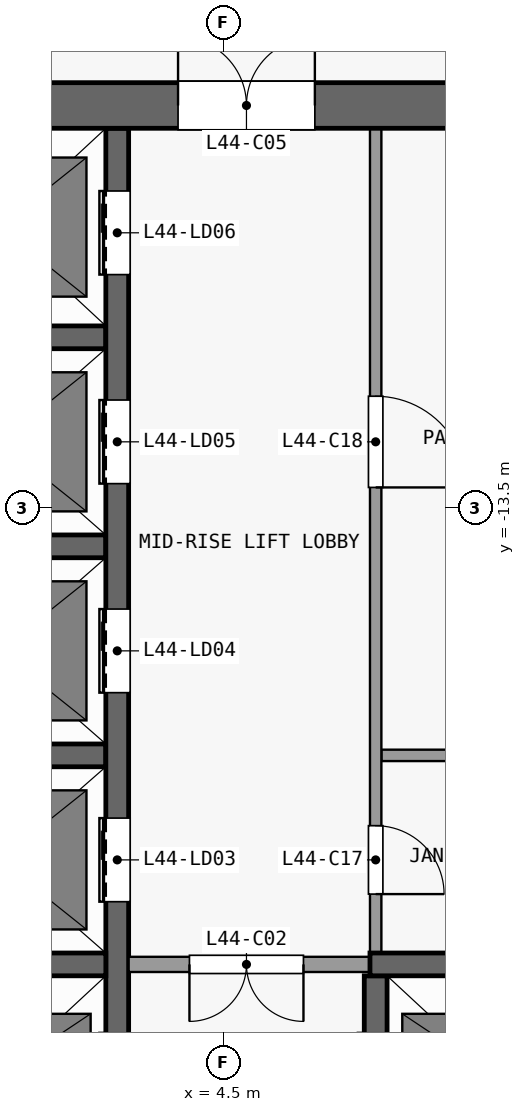
"""IFC4 building model, lengths in metres.
Left out: names, types, materials, properties, quantities, classifications, styles, units other than length and angle.
Written with IfcOpenShell. Run it as: python <this file> out.ifc"""

import sys

from ifc_helpers import new_model, si_unit, direction, frame, frame_2d, origin, place, context, subcontext, project, spatial, rectangle, extrude, element, fill, save


model = new_model("IFC4")
c1 = context("Model", 3, precision=1e-05, world=origin(), true_north=direction((0.0, 1.0)))
c2 = subcontext(c1, "Body", "Model", "MODEL_VIEW")
j1 = project(units=[si_unit("LENGTHUNIT", "METRE"), si_unit("PLANEANGLEUNIT", "RADIAN")], contexts=[c1])
p1 = place(None, origin())
s1 = spatial("IfcSite", under=j1, at=p1, CompositionType="ELEMENT")
p2 = place(p1, origin())
s2 = spatial("IfcBuilding", under=s1, at=p2, CompositionType="ELEMENT")
p3 = place(p2, frame((0.0, 0.0, 178.1)))
s3 = spatial("IfcBuildingStorey", under=s2, at=p3, CompositionType="ELEMENT", Elevation=178.1)
p4 = place(p3, frame((-13.3, -8.2, 0.0), z_axis=(0.0, 0.0, 1.0), x_axis=(1.0, 0.0, 0.0)))
e1 = element("IfcWall", 1, at=p4, inside=s3, PredefinedType="SHEAR", context=c2, shape_type="SweptSolid", body=[
    extrude(rectangle(XDim=26.6, YDim=0.6, at=frame_2d((13.3, 0.0))), origin(), (0.0, 0.0, 1.0), 3.3),
])
p5 = place(p4, frame((7.6, 0.0, 0.0)))
e2 = element("IfcOpeningElement", 2, at=p5, cuts=e1, PredefinedType="OPENING", context=c2, shape_type="SweptSolid", body=[
    extrude(rectangle(XDim=1.8, YDim=2.1, at=frame_2d((0.9, 1.05))), frame((0.0, 0.31, 0.0), z_axis=(0.0, -1.0, 0.0), x_axis=(1.0, 0.0, 0.0)), (0.0, 0.0, 1.0), 0.62),
])
p6 = place(p4, frame((17.2, 0.0, 0.0)))
e3 = element("IfcOpeningElement", 3, at=p6, cuts=e1, PredefinedType="OPENING", context=c2, shape_type="SweptSolid", body=[
    extrude(rectangle(XDim=1.8, YDim=2.1, at=frame_2d((0.9, 1.05))), frame((0.0, 0.31, 0.0), z_axis=(0.0, -1.0, 0.0), x_axis=(1.0, 0.0, 0.0)), (0.0, 0.0, 1.0), 0.62),
])
p7 = place(p4, frame((2.525, 0.0, 0.0)))
e4 = element("IfcOpeningElement", 4, at=p7, cuts=e1, PredefinedType="OPENING", context=c2, shape_type="SweptSolid", body=[
    extrude(rectangle(XDim=0.9, YDim=2.1, at=frame_2d((0.45, 1.05))), frame((0.0, 0.31, 0.0), z_axis=(0.0, -1.0, 0.0), x_axis=(1.0, 0.0, 0.0)), (0.0, 0.0, 1.0), 0.62),
])
p8 = place(p4, frame((23.175, 0.0, 0.0)))
e5 = element("IfcOpeningElement", 5, at=p8, cuts=e1, PredefinedType="OPENING", context=c2, shape_type="SweptSolid", body=[
    extrude(rectangle(XDim=0.9, YDim=2.1, at=frame_2d((0.45, 1.05))), frame((0.0, 0.31, 0.0), z_axis=(0.0, -1.0, 0.0), x_axis=(1.0, 0.0, 0.0)), (0.0, 0.0, 1.0), 0.62),
])
p9 = place(p3, frame((0.15, -19.5, 0.0), z_axis=(0.0, 0.0, 1.0), x_axis=(1.0, 0.0, 0.0)))
e6 = element("IfcWall", 6, at=p9, inside=s3, PredefinedType="SHEAR", context=c2, shape_type="SweptSolid", body=[
    extrude(rectangle(XDim=2.8, YDim=0.3, at=frame_2d((1.4, 0.0))), origin(), (0.0, 0.0, 1.0), 3.3),
])
p10 = place(p3, frame((6.575, -19.5, 0.0), z_axis=(0.0, 0.0, 1.0), x_axis=(-1.0, 0.0, 0.0)))
e7 = element("IfcWall", 7, at=p10, inside=s3, PredefinedType="PARTITIONING", context=c2, shape_type="SweptSolid", body=[
    extrude(rectangle(XDim=3.325, YDim=0.2, at=frame_2d((1.663, 0.0))), origin(), (0.0, 0.0, 1.0), 3.3),
])
p11 = place(p10, frame((1.025, 0.0, 0.0)))
e8 = element("IfcOpeningElement", 8, at=p11, cuts=e7, PredefinedType="OPENING", context=c2, shape_type="SweptSolid", body=[
    extrude(rectangle(XDim=1.5, YDim=2.1, at=frame_2d((0.75, 1.05))), frame((0.0, 0.11, 0.0), z_axis=(0.0, -1.0, 0.0), x_axis=(1.0, 0.0, 0.0)), (0.0, 0.0, 1.0), 0.22),
])
p12 = place(p3, frame((6.425, -19.5, 0.0), z_axis=(0.0, 0.0, 1.0), x_axis=(1.0, 0.0, 0.0)))
e9 = element("IfcWall", 9, at=p12, inside=s3, PredefinedType="SHEAR", context=c2, shape_type="SweptSolid", body=[
    extrude(rectangle(XDim=3.025, YDim=0.3, at=frame_2d((1.512, 0.0))), origin(), (0.0, 0.0, 1.0), 3.3),
])
p13 = place(p3, frame((0.15, -16.75, 0.0), z_axis=(0.0, 0.0, 1.0), x_axis=(1.0, 0.0, 0.0)))
e10 = element("IfcWall", 10, at=p13, inside=s3, PredefinedType="SHEAR", context=c2, shape_type="SweptSolid", body=[
    extrude(rectangle(XDim=2.8, YDim=0.3, at=frame_2d((1.4, 0.0))), origin(), (0.0, 0.0, 1.0), 3.3),
])
p14 = place(p3, frame((6.575, -16.75, 0.0), z_axis=(0.0, 0.0, 1.0), x_axis=(1.0, 0.0, 0.0)))
e11 = element("IfcWall", 11, at=p14, inside=s3, PredefinedType="PARTITIONING", context=c2, shape_type="SweptSolid", body=[
    extrude(rectangle(XDim=2.925, YDim=0.15, at=frame_2d((1.462, 0.0))), origin(), (0.0, 0.0, 1.0), 3.3),
])
for number, where, z_axis, x_axis in (
    (12, (0.15, -14.0, 0.0), (0.0, 0.0, 1.0), (1.0, 0.0, 0.0)),
    (13, (0.15, -11.25, 0.0), (0.0, 0.0, 1.0), (1.0, 0.0, 0.0)),
):
    element("IfcWall", number, at=place(p3, frame(where, z_axis=z_axis, x_axis=x_axis)), inside=s3, PredefinedType="SHEAR", context=c2, shape_type="SweptSolid", body=[
        extrude(rectangle(XDim=2.8, YDim=0.3, at=frame_2d((1.4, 0.0))), origin(), (0.0, 0.0, 1.0), 3.3),
    ])
p15 = place(p3, frame((3.1, -22.55, 0.0), z_axis=(0.0, 0.0, 1.0), x_axis=(0.0, 1.0, 0.0)))
e14 = element("IfcWall", 14, at=p15, inside=s3, PredefinedType="SHEAR", context=c2, shape_type="SweptSolid", body=[
    extrude(rectangle(XDim=14.05, YDim=0.3, at=frame_2d((7.025, 0.0))), origin(), (0.0, 0.0, 1.0), 3.3),
])
p16 = place(p15, frame((1.05, 0.0, 0.0)))
e15 = element("IfcOpeningElement", 15, at=p16, cuts=e14, PredefinedType="OPENING", context=c2, shape_type="SweptSolid", body=[
    extrude(rectangle(XDim=1.1, YDim=2.1, at=frame_2d((0.55, 1.05))), frame((0.0, 0.16, 0.0), z_axis=(0.0, -1.0, 0.0), x_axis=(1.0, 0.0, 0.0)), (0.0, 0.0, 1.0), 0.32),
])
p17 = place(p15, frame((3.875, 0.0, 0.0)))
e16 = element("IfcOpeningElement", 16, at=p17, cuts=e14, PredefinedType="OPENING", context=c2, shape_type="SweptSolid", body=[
    extrude(rectangle(XDim=1.1, YDim=2.1, at=frame_2d((0.55, 1.05))), frame((0.0, 0.16, 0.0), z_axis=(0.0, -1.0, 0.0), x_axis=(1.0, 0.0, 0.0)), (0.0, 0.0, 1.0), 0.32),
])
p18 = place(p15, frame((6.625, 0.0, 0.0)))
e17 = element("IfcOpeningElement", 17, at=p18, cuts=e14, PredefinedType="OPENING", context=c2, shape_type="SweptSolid", body=[
    extrude(rectangle(XDim=1.1, YDim=2.1, at=frame_2d((0.55, 1.05))), frame((0.0, 0.16, 0.0), z_axis=(0.0, -1.0, 0.0), x_axis=(1.0, 0.0, 0.0)), (0.0, 0.0, 1.0), 0.32),
])
p19 = place(p15, frame((9.375, 0.0, 0.0)))
e18 = element("IfcOpeningElement", 18, at=p19, cuts=e14, PredefinedType="OPENING", context=c2, shape_type="SweptSolid", body=[
    extrude(rectangle(XDim=1.1, YDim=2.1, at=frame_2d((0.55, 1.05))), frame((0.0, 0.16, 0.0), z_axis=(0.0, -1.0, 0.0), x_axis=(1.0, 0.0, 0.0)), (0.0, 0.0, 1.0), 0.32),
])
p20 = place(p15, frame((12.125, 0.0, 0.0)))
e19 = element("IfcOpeningElement", 19, at=p20, cuts=e14, PredefinedType="OPENING", context=c2, shape_type="SweptSolid", body=[
    extrude(rectangle(XDim=1.1, YDim=2.1, at=frame_2d((0.55, 1.05))), frame((0.0, 0.16, 0.0), z_axis=(0.0, -1.0, 0.0), x_axis=(1.0, 0.0, 0.0)), (0.0, 0.0, 1.0), 0.32),
])
p21 = place(p3, frame((6.5, -22.25, 0.0), z_axis=(0.0, 0.0, 1.0), x_axis=(0.0, 1.0, 0.0)))
e20 = element("IfcWall", 20, at=p21, inside=s3, PredefinedType="SHEAR", context=c2, shape_type="SweptSolid", body=[
    extrude(rectangle(XDim=2.6, YDim=0.3, at=frame_2d((1.3, 0.0))), origin(), (0.0, 0.0, 1.0), 3.3),
])
p22 = place(p21, frame((0.75, 0.0, 0.0)))
e21 = element("IfcOpeningElement", 21, at=p22, cuts=e20, PredefinedType="OPENING", context=c2, shape_type="SweptSolid", body=[
    extrude(rectangle(XDim=1.1, YDim=2.1, at=frame_2d((0.55, 1.05))), frame((0.0, 0.16, 0.0), z_axis=(0.0, -1.0, 0.0), x_axis=(1.0, 0.0, 0.0)), (0.0, 0.0, 1.0), 0.32),
])
p23 = place(p3, frame((6.5, -8.5, 0.0), z_axis=(0.0, 0.0, 1.0), x_axis=(0.0, -1.0, 0.0)))
e22 = element("IfcWall", 22, at=p23, inside=s3, PredefinedType="PARTITIONING", context=c2, shape_type="SweptSolid", body=[
    extrude(rectangle(XDim=10.85, YDim=0.15, at=frame_2d((5.425, 0.0))), origin(), (0.0, 0.0, 1.0), 3.3),
])
p24 = place(p23, frame((9.175, 0.0, 0.0)))
e23 = element("IfcOpeningElement", 23, at=p24, cuts=e22, PredefinedType="OPENING", context=c2, shape_type="SweptSolid", body=[
    extrude(rectangle(XDim=0.9, YDim=2.1, at=frame_2d((0.45, 1.05))), frame((0.0, 0.085, 0.0), z_axis=(0.0, -1.0, 0.0), x_axis=(1.0, 0.0, 0.0)), (0.0, 0.0, 1.0), 0.17),
])
p25 = place(p23, frame((3.525, 0.0, 0.0)))
e24 = element("IfcOpeningElement", 24, at=p25, cuts=e22, PredefinedType="OPENING", context=c2, shape_type="SweptSolid", body=[
    extrude(rectangle(XDim=1.2, YDim=2.1, at=frame_2d((0.6, 1.05))), frame((0.0, 0.085, 0.0), z_axis=(0.0, -1.0, 0.0), x_axis=(1.0, 0.0, 0.0)), (0.0, 0.0, 1.0), 0.17),
])
p26 = place(p17, origin())
e25 = element("IfcDoor", 25, at=p26, inside=s3, OperationType="DOUBLE_DOOR_SLIDING", PredefinedType="DOOR", context=c2, shape_type="SweptSolid", body=[
    extrude(rectangle(XDim=1.1, YDim=2.1, at=frame_2d((0.55, 1.05))), frame((0.0, 0.025, 0.0), z_axis=(0.0, -1.0, 0.0), x_axis=(1.0, 0.0, 0.0)), (0.0, 0.0, 1.0), 0.05),
])
fill(e16, e25)
p27 = place(p18, origin())
e26 = element("IfcDoor", 26, at=p27, inside=s3, OperationType="DOUBLE_DOOR_SLIDING", PredefinedType="DOOR", context=c2, shape_type="SweptSolid", body=[
    extrude(rectangle(XDim=1.1, YDim=2.1, at=frame_2d((0.55, 1.05))), frame((0.0, 0.025, 0.0), z_axis=(0.0, -1.0, 0.0), x_axis=(1.0, 0.0, 0.0)), (0.0, 0.0, 1.0), 0.05),
])
fill(e17, e26)
p28 = place(p19, origin())
e27 = element("IfcDoor", 27, at=p28, inside=s3, OperationType="DOUBLE_DOOR_SLIDING", PredefinedType="DOOR", context=c2, shape_type="SweptSolid", body=[
    extrude(rectangle(XDim=1.1, YDim=2.1, at=frame_2d((0.55, 1.05))), frame((0.0, 0.025, 0.0), z_axis=(0.0, -1.0, 0.0), x_axis=(1.0, 0.0, 0.0)), (0.0, 0.0, 1.0), 0.05),
])
fill(e18, e27)
p29 = place(p20, origin())
e28 = element("IfcDoor", 28, at=p29, inside=s3, OperationType="DOUBLE_DOOR_SLIDING", PredefinedType="DOOR", context=c2, shape_type="SweptSolid", body=[
    extrude(rectangle(XDim=1.1, YDim=2.1, at=frame_2d((0.55, 1.05))), frame((0.0, 0.025, 0.0), z_axis=(0.0, -1.0, 0.0), x_axis=(1.0, 0.0, 0.0)), (0.0, 0.0, 1.0), 0.05),
])
fill(e19, e28)
p30 = place(p11, origin())
e29 = element("IfcDoor", 29, at=p30, inside=s3, OperationType="DOUBLE_DOOR_SINGLE_SWING", PredefinedType="DOOR", context=c2, shape_type="SweptSolid", body=[
    extrude(rectangle(XDim=1.5, YDim=2.1, at=frame_2d((0.75, 1.05))), frame((0.0, 0.025, 0.0), z_axis=(0.0, -1.0, 0.0), x_axis=(1.0, 0.0, 0.0)), (0.0, 0.0, 1.0), 0.05),
])
fill(e8, e29)
p31 = place(p6, origin())
e30 = element("IfcDoor", 30, at=p31, inside=s3, OperationType="DOUBLE_DOOR_SINGLE_SWING", PredefinedType="DOOR", context=c2, shape_type="SweptSolid", body=[
    extrude(rectangle(XDim=1.8, YDim=2.1, at=frame_2d((0.9, 1.05))), frame((0.0, 0.025, 0.0), z_axis=(0.0, -1.0, 0.0), x_axis=(1.0, 0.0, 0.0)), (0.0, 0.0, 1.0), 0.05),
])
fill(e3, e30)
p32 = place(p24, origin())
e31 = element("IfcDoor", 31, at=p32, inside=s3, OperationType="SINGLE_SWING_RIGHT", PredefinedType="DOOR", context=c2, shape_type="SweptSolid", body=[
    extrude(rectangle(XDim=0.9, YDim=2.1, at=frame_2d((0.45, 1.05))), frame((0.0, 0.025, 0.0), z_axis=(0.0, -1.0, 0.0), x_axis=(1.0, 0.0, 0.0)), (0.0, 0.0, 1.0), 0.05),
])
fill(e23, e31)
p33 = place(p25, origin())
e32 = element("IfcDoor", 32, at=p33, inside=s3, OperationType="SINGLE_SWING_RIGHT", PredefinedType="DOOR", context=c2, shape_type="SweptSolid", body=[
    extrude(rectangle(XDim=1.2, YDim=2.1, at=frame_2d((0.6, 1.05))), frame((0.0, 0.025, 0.0), z_axis=(0.0, -1.0, 0.0), x_axis=(1.0, 0.0, 0.0)), (0.0, 0.0, 1.0), 0.05),
])
fill(e24, e32)
save(model, sys.argv[1])
